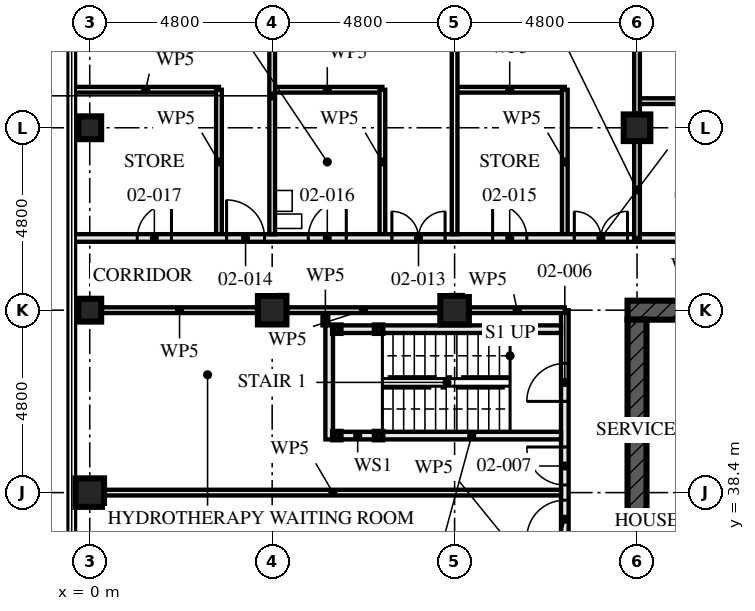
"""IFC4 building model, lengths in metres.
Left out: names, types, materials, properties, quantities, classifications, styles, units other than length and angle.
Written with IfcOpenShell. Run it as: python <this file> out.ifc"""

import sys

from ifc_helpers import new_model, si_unit, direction, frame, frame_2d, origin, origin_2d, place, context, subcontext, project, spatial, rectangle, hollow_rectangle, extrude, element, fill, save


model = new_model("IFC4")
c1 = context("Model", 3, precision=1e-05, world=origin(), true_north=direction((0.0, 1.0)))
c2 = subcontext(c1, "Body", "Model", "MODEL_VIEW")
j1 = project(units=[si_unit("LENGTHUNIT", "METRE"), si_unit("PLANEANGLEUNIT", "RADIAN")], contexts=[c1])
p1 = place(None, origin())
s1 = spatial("IfcSite", under=j1, at=p1, CompositionType="ELEMENT")
p2 = place(p1, origin())
s2 = spatial("IfcBuilding", under=s1, at=p2, CompositionType="ELEMENT")
p3 = place(p2, frame((0.0, 0.0, 9.0)))
s3 = spatial("IfcBuildingStorey", under=s2, at=p3, CompositionType="ELEMENT", Elevation=9.0)
p4 = place(p3, frame((0.0, 38.4, 0.0), z_axis=(0.0, 0.0, 1.0), x_axis=(1.0, 0.0, 0.0)))
e1 = element("IfcColumn", 1, at=p4, inside=s3, PredefinedType="COLUMN", context=c2, shape_type="SweptSolid", body=[
    extrude(hollow_rectangle(XDim=0.75, YDim=0.75, WallThickness=0.08, at=origin_2d()), origin(), (0.0, 0.0, 1.0), 4.5),
])
for number, where, z_axis, x_axis in (
    (2, (0.0, 43.2, 0.0), (0.0, 0.0, 1.0), (0.0, 1.0, 0.0)),
    (3, (0.0, 48.0, 0.0), (0.0, 0.0, 1.0), (1.0, 0.0, 0.0)),
):
    element("IfcColumn", number, at=place(p3, frame(where, z_axis=z_axis, x_axis=x_axis)), inside=s3, PredefinedType="COLUMN", context=c2, shape_type="SweptSolid", body=[
        extrude(hollow_rectangle(XDim=0.6, YDim=0.6, WallThickness=0.08, at=origin_2d()), origin(), (0.0, 0.0, 1.0), 4.5),
    ])
for number, where, z_axis, x_axis in (
    (4, (4.8, 43.2, 0.0), (0.0, 0.0, 1.0), (0.0, 1.0, 0.0)),
    (5, (9.6, 43.2, 0.0), (0.0, 0.0, 1.0), (0.0, 1.0, 0.0)),
):
    element("IfcColumn", number, at=place(p3, frame(where, z_axis=z_axis, x_axis=x_axis)), inside=s3, PredefinedType="COLUMN", context=c2, shape_type="SweptSolid", body=[
        extrude(hollow_rectangle(XDim=0.75, YDim=0.75, WallThickness=0.08, at=origin_2d()), origin(), (0.0, 0.0, 1.0), 4.5),
    ])
p5 = place(p3, frame((14.4, 48.0, 0.0), z_axis=(0.0, 0.0, 1.0), x_axis=(1.0, 0.0, 0.0)))
e6 = element("IfcColumn", 6, at=p5, inside=s3, PredefinedType="COLUMN", context=c2, shape_type="SweptSolid", body=[
    extrude(hollow_rectangle(XDim=0.7, YDim=0.7, WallThickness=0.06, at=origin_2d()), origin(), (0.0, 0.0, 1.0), 4.5),
])
p6 = place(p3, frame((29.05, 43.2, -0.17), z_axis=(0.0, 0.0, 1.0), x_axis=(-1.0, 0.0, 0.0)))
e7 = element("IfcWall", 7, at=p6, inside=s3, PredefinedType="SHEAR", context=c2, shape_type="SweptSolid", body=[
    extrude(rectangle(XDim=14.9, YDim=0.5, at=frame_2d((7.45, 0.0))), origin(), (0.0, 0.0, 1.0), 4.5),
])
p7 = place(p6, frame((6.85, 0.0, 0.17)))
e8 = element("IfcOpeningElement", 8, at=p7, cuts=e7, PredefinedType="OPENING", context=c2, shape_type="SweptSolid", body=[
    extrude(rectangle(XDim=1.2, YDim=2.1, at=frame_2d((0.6, 1.05))), frame((0.0, 0.26, 0.0), z_axis=(0.0, -1.0, 0.0), x_axis=(1.0, 0.0, 0.0)), (0.0, 0.0, 1.0), 0.521),
])
p8 = place(p3, frame((14.4, 42.95, -0.17), z_axis=(0.0, 0.0, 1.0), x_axis=(0.0, -1.0, 0.0)))
e9 = element("IfcWall", 9, at=p8, inside=s3, PredefinedType="SHEAR", context=c2, shape_type="SweptSolid", body=[
    extrude(rectangle(XDim=13.9, YDim=0.5, at=frame_2d((6.95, 0.0))), origin(), (0.0, 0.0, 1.0), 4.5),
])
p9 = place(p8, frame((6.35, 0.0, 0.17)))
e10 = element("IfcOpeningElement", 10, at=p9, cuts=e9, PredefinedType="OPENING", context=c2, shape_type="SweptSolid", body=[
    extrude(rectangle(XDim=1.2, YDim=2.1, at=frame_2d((0.6, 1.05))), frame((0.0, 0.26, 0.0), z_axis=(0.0, -1.0, 0.0), x_axis=(1.0, 0.0, 0.0)), (0.0, 0.0, 1.0), 0.521),
])
for number, where, z_axis, x_axis in (
    (11, (6.5, 42.7, 0.0), (0.0, 0.0, 1.0), (1.0, 0.0, 0.0)),
    (12, (6.5, 39.9, 0.0), (0.0, 0.0, 1.0), (1.0, 0.0, 0.0)),
    (13, (7.6, 42.7, 0.0), (0.0, 0.0, 1.0), (1.0, 0.0, 0.0)),
    (14, (7.6, 39.9, 0.0), (0.0, 0.0, 1.0), (1.0, 0.0, 0.0)),
):
    element("IfcColumn", number, at=place(p3, frame(where, z_axis=z_axis, x_axis=x_axis)), inside=s3, PredefinedType="COLUMN", context=c2, shape_type="SweptSolid", body=[
        extrude(hollow_rectangle(XDim=0.2, YDim=0.2, WallThickness=0.008, at=origin_2d()), origin(), (0.0, 0.0, 1.0), 4.33),
    ])
p10 = place(p3, frame((6.6, 42.7, 0.0), z_axis=(0.0, 0.0, 1.0), x_axis=(1.0, 0.0, 0.0)))
e15 = element("IfcWall", 15, at=p10, inside=s3, PredefinedType="SOLIDWALL", context=c2, shape_type="SweptSolid", body=[
    extrude(rectangle(XDim=0.9, YDim=0.2, at=frame_2d((0.45, 0.0))), origin(), (0.0, 0.0, 1.0), 3.99),
])
p11 = place(p3, frame((7.7, 42.7, 0.0), z_axis=(0.0, 0.0, 1.0), x_axis=(1.0, 0.0, 0.0)))
e16 = element("IfcWall", 16, at=p11, inside=s3, PredefinedType="SOLIDWALL", context=c2, shape_type="SweptSolid", body=[
    extrude(rectangle(XDim=4.7, YDim=0.2, at=frame_2d((2.35, 0.0))), origin(), (0.0, 0.0, 1.0), 3.99),
])
p12 = place(p3, frame((6.6, 39.9, 0.0), z_axis=(0.0, 0.0, 1.0), x_axis=(1.0, 0.0, 0.0)))
e17 = element("IfcWall", 17, at=p12, inside=s3, PredefinedType="SOLIDWALL", context=c2, shape_type="SweptSolid", body=[
    extrude(rectangle(XDim=0.9, YDim=0.2, at=frame_2d((0.45, 0.0))), origin(), (0.0, 0.0, 1.0), 3.99),
])
p13 = place(p3, frame((7.7, 39.9, 0.0), z_axis=(0.0, 0.0, 1.0), x_axis=(1.0, 0.0, 0.0)))
e18 = element("IfcWall", 18, at=p13, inside=s3, PredefinedType="SOLIDWALL", context=c2, shape_type="SweptSolid", body=[
    extrude(rectangle(XDim=4.7, YDim=0.2, at=frame_2d((2.35, 0.0))), origin(), (0.0, 0.0, 1.0), 3.99),
])
p14 = place(p3, frame((6.3, 42.8, 0.0), z_axis=(0.0, 0.0, 1.0), x_axis=(0.0, -1.0, 0.0)))
e19 = element("IfcWall", 19, at=p14, inside=s3, PredefinedType="SOLIDWALL", context=c2, shape_type="SweptSolid", body=[
    extrude(rectangle(XDim=3.0, YDim=0.2, at=frame_2d((1.5, 0.0))), origin(), (0.0, 0.0, 1.0), 4.33),
])
p15 = place(p3, frame((0.395, 38.4, 0.0), z_axis=(0.0, 0.0, 1.0), x_axis=(1.0, 0.0, 0.0)))
e20 = element("IfcWall", 20, at=p15, inside=s3, PredefinedType="PARTITIONING", context=c2, shape_type="SweptSolid", body=[
    extrude(rectangle(XDim=12.005, YDim=0.15, at=frame_2d((6.002, 0.0))), origin(), (0.0, 0.0, 1.0), 3.55),
])
p16 = place(p3, frame((6.2, 43.2, 0.0), z_axis=(0.0, 0.0, 1.0), x_axis=(0.0, -1.0, 0.0)))
e21 = element("IfcWall", 21, at=p16, inside=s3, PredefinedType="PARTITIONING", context=c2, shape_type="SweptSolid", body=[
    extrude(rectangle(XDim=0.4, YDim=0.15, at=frame_2d((0.2, 0.0))), origin(), (0.0, 0.0, 1.0), 4.33),
])
p17 = place(p3, frame((12.5, 43.2, 0.0), z_axis=(0.0, 0.0, 1.0), x_axis=(0.0, -1.0, 0.0)))
e22 = element("IfcWall", 22, at=p17, inside=s3, PredefinedType="PARTITIONING", context=c2, shape_type="SweptSolid", body=[
    extrude(rectangle(XDim=14.4, YDim=0.2, at=frame_2d((7.2, 0.0))), origin(), (0.0, 0.0, 1.0), 3.55),
])
p18 = place(p17, frame((1.4, 0.0, 0.0)))
e23 = element("IfcOpeningElement", 23, at=p18, cuts=e22, PredefinedType="OPENING", context=c2, shape_type="SweptSolid", body=[
    extrude(rectangle(XDim=1.0, YDim=2.1, at=frame_2d((0.5, 1.05))), frame((0.0, 0.111, 0.0), z_axis=(0.0, -1.0, 0.0), x_axis=(1.0, 0.0, 0.0)), (0.0, 0.0, 1.0), 0.221),
])
p19 = place(p17, frame((3.6, 0.0, 0.0)))
e24 = element("IfcOpeningElement", 24, at=p19, cuts=e22, PredefinedType="OPENING", context=c2, shape_type="SweptSolid", body=[
    extrude(rectangle(XDim=1.0, YDim=2.4, at=frame_2d((0.5, 1.2))), frame((0.0, 0.111, 0.0), z_axis=(0.0, -1.0, 0.0), x_axis=(1.0, 0.0, 0.0)), (0.0, 0.0, 1.0), 0.221),
])
p20 = place(p17, frame((5.0, 0.0, 0.0)))
e25 = element("IfcOpeningElement", 25, at=p20, cuts=e22, PredefinedType="OPENING", context=c2, shape_type="SweptSolid", body=[
    extrude(rectangle(XDim=1.0, YDim=2.4, at=frame_2d((0.5, 1.2))), frame((0.0, 0.111, 0.0), z_axis=(0.0, -1.0, 0.0), x_axis=(1.0, 0.0, 0.0)), (0.0, 0.0, 1.0), 0.221),
])
p21 = place(p17, frame((9.8, 0.0, 0.0)))
e26 = element("IfcOpeningElement", 26, at=p21, cuts=e22, PredefinedType="OPENING", context=c2, shape_type="SweptSolid", body=[
    extrude(rectangle(XDim=1.0, YDim=2.4, at=frame_2d((0.5, 1.2))), frame((0.0, 0.111, 0.0), z_axis=(0.0, -1.0, 0.0), x_axis=(1.0, 0.0, 0.0)), (0.0, 0.0, 1.0), 0.221),
])
p22 = place(p17, frame((7.45, 0.0, 0.0)))
e27 = element("IfcOpeningElement", 27, at=p22, cuts=e22, PredefinedType="OPENING", context=c2, shape_type="SweptSolid", body=[
    extrude(rectangle(XDim=0.9, YDim=2.1, at=frame_2d((0.45, 1.05))), frame((0.0, 0.111, 0.0), z_axis=(0.0, -1.0, 0.0), x_axis=(1.0, 0.0, 0.0)), (0.0, 0.0, 1.0), 0.221),
])
p23 = place(p17, frame((12.2, 0.0, 0.0)))
e28 = element("IfcOpeningElement", 28, at=p23, cuts=e22, PredefinedType="OPENING", context=c2, shape_type="SweptSolid", body=[
    extrude(rectangle(XDim=1.0, YDim=2.1, at=frame_2d((0.5, 1.05))), frame((0.0, 0.111, 0.0), z_axis=(0.0, -1.0, 0.0), x_axis=(1.0, 0.0, 0.0)), (0.0, 0.0, 1.0), 0.221),
])
p24 = place(p3, frame((12.5, 49.0, 0.0), z_axis=(0.0, 0.0, 1.0), x_axis=(0.0, -1.0, 0.0)))
e29 = element("IfcWall", 29, at=p24, inside=s3, PredefinedType="PARTITIONING", context=c2, shape_type="SweptSolid", body=[
    extrude(rectangle(XDim=3.8, YDim=0.15, at=frame_2d((1.9, 0.0))), origin(), (0.0, 0.0, 1.0), 3.55),
])
p25 = place(p3, frame((12.5, 49.0, 0.0), z_axis=(0.0, 0.0, 1.0), x_axis=(-1.0, 0.0, 0.0)))
e30 = element("IfcWall", 30, at=p25, inside=s3, PredefinedType="PARTITIONING", context=c2, shape_type="SweptSolid", body=[
    extrude(rectangle(XDim=2.9, YDim=0.15, at=frame_2d((1.45, 0.0))), origin(), (0.0, 0.0, 1.0), 4.33),
])
p26 = place(p3, frame((7.7, 49.0, 0.0), z_axis=(0.0, 0.0, 1.0), x_axis=(0.0, -1.0, 0.0)))
e31 = element("IfcWall", 31, at=p26, inside=s3, PredefinedType="PARTITIONING", context=c2, shape_type="SweptSolid", body=[
    extrude(rectangle(XDim=3.8, YDim=0.15, at=frame_2d((1.9, 0.0))), origin(), (0.0, 0.0, 1.0), 3.55),
])
p27 = place(p3, frame((7.7, 49.0, 0.0), z_axis=(0.0, 0.0, 1.0), x_axis=(-1.0, 0.0, 0.0)))
e32 = element("IfcWall", 32, at=p27, inside=s3, PredefinedType="PARTITIONING", context=c2, shape_type="SweptSolid", body=[
    extrude(rectangle(XDim=2.9, YDim=0.15, at=frame_2d((1.45, 0.0))), origin(), (0.0, 0.0, 1.0), 4.33),
])
p28 = place(p3, frame((3.4, 49.0, 0.0), z_axis=(0.0, 0.0, 1.0), x_axis=(0.0, -1.0, 0.0)))
e33 = element("IfcWall", 33, at=p28, inside=s3, PredefinedType="PARTITIONING", context=c2, shape_type="SweptSolid", body=[
    extrude(rectangle(XDim=3.8, YDim=0.15, at=frame_2d((1.9, 0.0))), origin(), (0.0, 0.0, 1.0), 3.55),
])
p29 = place(p3, frame((3.4, 49.0, 0.0), z_axis=(0.0, 0.0, 1.0), x_axis=(-1.0, 0.0, 0.0)))
e34 = element("IfcWall", 34, at=p29, inside=s3, PredefinedType="PARTITIONING", context=c2, shape_type="SweptSolid", body=[
    extrude(rectangle(XDim=3.855, YDim=0.15, at=frame_2d((1.927, 0.0))), origin(), (0.0, 0.0, 1.0), 3.32),
])
p30 = place(p3, frame((9.6, 57.28, 0.0), z_axis=(0.0, 0.0, 1.0), x_axis=(0.0, -1.0, 0.0)))
e35 = element("IfcWall", 35, at=p30, inside=s3, PredefinedType="PARTITIONING", context=c2, shape_type="SweptSolid", body=[
    extrude(rectangle(XDim=12.08, YDim=0.15, at=frame_2d((6.04, 0.0))), origin(), (0.0, 0.0, 1.0), 3.55),
])
p31 = place(p3, frame((4.8, 52.48, 0.0), z_axis=(0.0, 0.0, 1.0), x_axis=(0.0, -1.0, 0.0)))
e36 = element("IfcWall", 36, at=p31, inside=s3, PredefinedType="PARTITIONING", context=c2, shape_type="SweptSolid", body=[
    extrude(rectangle(XDim=7.28, YDim=0.15, at=frame_2d((3.64, 0.0))), origin(), (0.0, 0.0, 1.0), 3.55),
])
p32 = place(p3, frame((14.4, 45.1, 0.0), z_axis=(0.0, 0.0, 1.0), x_axis=(-1.0, 0.0, 0.0)))
e37 = element("IfcWall", 37, at=p32, inside=s3, PredefinedType="PARTITIONING", context=c2, shape_type="SweptSolid", body=[
    extrude(rectangle(XDim=14.855, YDim=0.2, at=frame_2d((7.427, 0.0))), origin(), (0.0, 0.0, 1.0), 3.32),
])
p33 = place(p32, frame((0.25, 0.0, 0.0)))
e38 = element("IfcOpeningElement", 38, at=p33, cuts=e37, PredefinedType="OPENING", context=c2, shape_type="SweptSolid", body=[
    extrude(rectangle(XDim=1.4, YDim=2.4, at=frame_2d((0.7, 1.2))), frame((0.0, 0.111, 0.0), z_axis=(0.0, -1.0, 0.0), x_axis=(1.0, 0.0, 0.0)), (0.0, 0.0, 1.0), 0.221),
])
p34 = place(p32, frame((5.05, 0.0, 0.0)))
e39 = element("IfcOpeningElement", 39, at=p34, cuts=e37, PredefinedType="OPENING", context=c2, shape_type="SweptSolid", body=[
    extrude(rectangle(XDim=1.4, YDim=2.4, at=frame_2d((0.7, 1.2))), frame((0.0, 0.111, 0.0), z_axis=(0.0, -1.0, 0.0), x_axis=(1.0, 0.0, 0.0)), (0.0, 0.0, 1.0), 0.221),
])
p35 = place(p32, frame((9.8, 0.0, 0.0)))
e40 = element("IfcOpeningElement", 40, at=p35, cuts=e37, PredefinedType="OPENING", context=c2, shape_type="SweptSolid", body=[
    extrude(rectangle(XDim=1.0, YDim=2.4, at=frame_2d((0.5, 1.2))), frame((0.0, 0.111, 0.0), z_axis=(0.0, -1.0, 0.0), x_axis=(1.0, 0.0, 0.0)), (0.0, 0.0, 1.0), 0.221),
])
p36 = place(p32, frame((2.9, 0.0, 0.0)))
e41 = element("IfcOpeningElement", 41, at=p36, cuts=e37, PredefinedType="OPENING", context=c2, shape_type="SweptSolid", body=[
    extrude(rectangle(XDim=0.9, YDim=2.1, at=frame_2d((0.45, 1.05))), frame((0.0, 0.111, 0.0), z_axis=(0.0, -1.0, 0.0), x_axis=(1.0, 0.0, 0.0)), (0.0, 0.0, 1.0), 0.221),
])
p37 = place(p32, frame((7.65, 0.0, 0.0)))
e42 = element("IfcOpeningElement", 42, at=p37, cuts=e37, PredefinedType="OPENING", context=c2, shape_type="SweptSolid", body=[
    extrude(rectangle(XDim=1.0, YDim=2.1, at=frame_2d((0.5, 1.05))), frame((0.0, 0.111, 0.0), z_axis=(0.0, -1.0, 0.0), x_axis=(1.0, 0.0, 0.0)), (0.0, 0.0, 1.0), 0.221),
])
p38 = place(p32, frame((12.25, 0.0, 0.0)))
e43 = element("IfcOpeningElement", 43, at=p38, cuts=e37, PredefinedType="OPENING", context=c2, shape_type="SweptSolid", body=[
    extrude(rectangle(XDim=0.9, YDim=2.1, at=frame_2d((0.45, 1.05))), frame((0.0, 0.111, 0.0), z_axis=(0.0, -1.0, 0.0), x_axis=(1.0, 0.0, 0.0)), (0.0, 0.0, 1.0), 0.221),
])
p39 = place(p3, frame((17.8, 48.7, 0.0), z_axis=(0.0, 0.0, 1.0), x_axis=(-1.0, 0.0, 0.0)))
e44 = element("IfcWall", 44, at=p39, inside=s3, PredefinedType="PARTITIONING", context=c2, shape_type="SweptSolid", body=[
    extrude(rectangle(XDim=3.4, YDim=0.15, at=frame_2d((1.7, 0.0))), origin(), (0.0, 0.0, 1.0), 4.33),
])
p40 = place(p3, frame((28.8, 45.1, 0.0), z_axis=(0.0, 0.0, 1.0), x_axis=(-1.0, 0.0, 0.0)))
e45 = element("IfcWall", 45, at=p40, inside=s3, PredefinedType="PARTITIONING", context=c2, shape_type="SweptSolid", body=[
    extrude(rectangle(XDim=14.4, YDim=0.2, at=frame_2d((7.2, 0.0))), origin(), (0.0, 0.0, 1.0), 4.33),
])
p41 = place(p40, frame((0.2, 0.0, 0.0)))
e46 = element("IfcOpeningElement", 46, at=p41, cuts=e45, PredefinedType="OPENING", context=c2, shape_type="SweptSolid", body=[
    extrude(rectangle(XDim=1.0, YDim=2.4, at=frame_2d((0.5, 1.2))), frame((0.0, 0.111, 0.0), z_axis=(0.0, -1.0, 0.0), x_axis=(1.0, 0.0, 0.0)), (0.0, 0.0, 1.0), 0.221),
])
p42 = place(p40, frame((5.0, 0.0, 0.0)))
e47 = element("IfcOpeningElement", 47, at=p42, cuts=e45, PredefinedType="OPENING", context=c2, shape_type="SweptSolid", body=[
    extrude(rectangle(XDim=1.0, YDim=2.4, at=frame_2d((0.5, 1.2))), frame((0.0, 0.111, 0.0), z_axis=(0.0, -1.0, 0.0), x_axis=(1.0, 0.0, 0.0)), (0.0, 0.0, 1.0), 0.221),
])
p43 = place(p40, frame((9.8, 0.0, 0.0)))
e48 = element("IfcOpeningElement", 48, at=p43, cuts=e45, PredefinedType="OPENING", context=c2, shape_type="SweptSolid", body=[
    extrude(rectangle(XDim=1.0, YDim=2.4, at=frame_2d((0.5, 1.2))), frame((0.0, 0.111, 0.0), z_axis=(0.0, -1.0, 0.0), x_axis=(1.0, 0.0, 0.0)), (0.0, 0.0, 1.0), 0.221),
])
p44 = place(p40, frame((2.65, 0.0, 0.0)))
e49 = element("IfcOpeningElement", 49, at=p44, cuts=e45, PredefinedType="OPENING", context=c2, shape_type="SweptSolid", body=[
    extrude(rectangle(XDim=0.9, YDim=2.1, at=frame_2d((0.45, 1.05))), frame((0.0, 0.111, 0.0), z_axis=(0.0, -1.0, 0.0), x_axis=(1.0, 0.0, 0.0)), (0.0, 0.0, 1.0), 0.221),
])
p45 = place(p40, frame((7.45, 0.0, 0.0)))
e50 = element("IfcOpeningElement", 50, at=p45, cuts=e45, PredefinedType="OPENING", context=c2, shape_type="SweptSolid", body=[
    extrude(rectangle(XDim=0.9, YDim=2.1, at=frame_2d((0.45, 1.05))), frame((0.0, 0.111, 0.0), z_axis=(0.0, -1.0, 0.0), x_axis=(1.0, 0.0, 0.0)), (0.0, 0.0, 1.0), 0.221),
])
p46 = place(p40, frame((12.25, 0.0, 0.0)))
e51 = element("IfcOpeningElement", 51, at=p46, cuts=e45, PredefinedType="OPENING", context=c2, shape_type="SweptSolid", body=[
    extrude(rectangle(XDim=0.9, YDim=2.1, at=frame_2d((0.45, 1.05))), frame((0.0, 0.111, 0.0), z_axis=(0.0, -1.0, 0.0), x_axis=(1.0, 0.0, 0.0)), (0.0, 0.0, 1.0), 0.221),
])
p47 = place(p3, frame((12.5, 43.2, 0.0), z_axis=(0.0, 0.0, 1.0), x_axis=(-1.0, 0.0, 0.0)))
e52 = element("IfcWall", 52, at=p47, inside=s3, PredefinedType="PARTITIONING", context=c2, shape_type="SweptSolid", body=[
    extrude(rectangle(XDim=2.505, YDim=0.15, at=frame_2d((1.252, 0.0))), origin(), (0.0, 0.0, 1.0), 3.32),
])
p48 = place(p3, frame((9.205, 43.2, 0.0), z_axis=(0.0, 0.0, 1.0), x_axis=(-1.0, 0.0, 0.0)))
e53 = element("IfcWall", 53, at=p48, inside=s3, PredefinedType="PARTITIONING", context=c2, shape_type="SweptSolid", body=[
    extrude(rectangle(XDim=4.01, YDim=0.15, at=frame_2d((2.005, 0.0))), origin(), (0.0, 0.0, 1.0), 3.32),
])
p49 = place(p3, frame((4.405, 43.2, 0.0), z_axis=(0.0, 0.0, 1.0), x_axis=(-1.0, 0.0, 0.0)))
e54 = element("IfcWall", 54, at=p49, inside=s3, PredefinedType="PARTITIONING", context=c2, shape_type="SweptSolid", body=[
    extrude(rectangle(XDim=4.085, YDim=0.15, at=frame_2d((2.042, 0.0))), origin(), (0.0, 0.0, 1.0), 3.32),
])
p50 = place(p3, frame((14.4, 45.1, 0.0), z_axis=(0.0, 0.0, 1.0), x_axis=(0.0, 1.0, 0.0)))
e55 = element("IfcWall", 55, at=p50, inside=s3, PredefinedType="PARTITIONING", context=c2, shape_type="SweptSolid", body=[
    extrude(rectangle(XDim=2.53, YDim=0.15, at=frame_2d((1.265, 0.0))), origin(), (0.0, 0.0, 1.0), 3.32),
])
p51 = place(p3, frame((14.4, 48.37, 0.0), z_axis=(0.0, 0.0, 1.0), x_axis=(0.0, 1.0, 0.0)))
e56 = element("IfcWall", 56, at=p51, inside=s3, PredefinedType="PARTITIONING", context=c2, shape_type="SweptSolid", body=[
    extrude(rectangle(XDim=4.06, YDim=0.15, at=frame_2d((2.03, 0.0))), origin(), (0.0, 0.0, 1.0), 3.32),
])
p52 = place(p18, frame((1.0, 0.0, 0.0), z_axis=(0.0, 0.0, 1.0), x_axis=(-1.0, 0.0, 0.0)))
e57 = element("IfcDoor", 57, at=p52, inside=s3, OperationType="SINGLE_SWING_RIGHT", PredefinedType="DOOR", context=c2, shape_type="SweptSolid", body=[
    extrude(rectangle(XDim=1.0, YDim=2.1, at=frame_2d((0.5, 1.05))), frame((0.0, 0.032, 0.0), z_axis=(0.0, -1.0, 0.0), x_axis=(1.0, 0.0, 0.0)), (0.0, 0.0, 1.0), 0.064),
])
fill(e23, e57)
p53 = place(p19, frame((1.0, 0.0, 0.0), z_axis=(0.0, 0.0, 1.0), x_axis=(-1.0, 0.0, 0.0)))
e58 = element("IfcDoor", 58, at=p53, inside=s3, OperationType="SINGLE_SWING_LEFT", PredefinedType="DOOR", context=c2, shape_type="SweptSolid", body=[
    extrude(rectangle(XDim=1.0, YDim=2.4, at=frame_2d((0.5, 1.2))), frame((0.0, 0.027, 0.0), z_axis=(0.0, -1.0, 0.0), x_axis=(1.0, 0.0, 0.0)), (0.0, 0.0, 1.0), 0.054),
])
fill(e24, e58)
p54 = place(p20, frame((1.0, 0.0, 0.0), z_axis=(0.0, 0.0, 1.0), x_axis=(-1.0, 0.0, 0.0)))
e59 = element("IfcDoor", 59, at=p54, inside=s3, OperationType="SINGLE_SWING_RIGHT", PredefinedType="DOOR", context=c2, shape_type="SweptSolid", body=[
    extrude(rectangle(XDim=1.0, YDim=2.4, at=frame_2d((0.5, 1.2))), frame((0.0, 0.027, 0.0), z_axis=(0.0, -1.0, 0.0), x_axis=(1.0, 0.0, 0.0)), (0.0, 0.0, 1.0), 0.054),
])
fill(e25, e59)
p55 = place(p33, frame((1.4, 0.0, 0.0), z_axis=(0.0, 0.0, 1.0), x_axis=(-1.0, 0.0, 0.0)))
e60 = element("IfcDoor", 60, at=p55, inside=s3, OperationType="DOUBLE_DOOR_SINGLE_SWING", PredefinedType="DOOR", context=c2, shape_type="SweptSolid", body=[
    extrude(rectangle(XDim=1.4, YDim=2.4, at=frame_2d((0.7, 1.2))), frame((0.0, 0.027, 0.0), z_axis=(0.0, -1.0, 0.0), x_axis=(1.0, 0.0, 0.0)), (0.0, 0.0, 1.0), 0.054),
])
fill(e38, e60)
p56 = place(p34, frame((1.4, 0.0, 0.0), z_axis=(0.0, 0.0, 1.0), x_axis=(-1.0, 0.0, 0.0)))
e61 = element("IfcDoor", 61, at=p56, inside=s3, OperationType="DOUBLE_DOOR_SINGLE_SWING", PredefinedType="DOOR", context=c2, shape_type="SweptSolid", body=[
    extrude(rectangle(XDim=1.4, YDim=2.4, at=frame_2d((0.7, 1.2))), frame((0.0, 0.027, 0.0), z_axis=(0.0, -1.0, 0.0), x_axis=(1.0, 0.0, 0.0)), (0.0, 0.0, 1.0), 0.054),
])
fill(e39, e61)
p57 = place(p35, frame((1.0, 0.0, 0.0), z_axis=(0.0, 0.0, 1.0), x_axis=(-1.0, 0.0, 0.0)))
e62 = element("IfcDoor", 62, at=p57, inside=s3, OperationType="SINGLE_SWING_RIGHT", PredefinedType="DOOR", context=c2, shape_type="SweptSolid", body=[
    extrude(rectangle(XDim=1.0, YDim=2.4, at=frame_2d((0.5, 1.2))), frame((0.0, 0.027, 0.0), z_axis=(0.0, -1.0, 0.0), x_axis=(1.0, 0.0, 0.0)), (0.0, 0.0, 1.0), 0.054),
])
fill(e40, e62)
p58 = place(p36, frame((0.9, 0.0, 0.0), z_axis=(0.0, 0.0, 1.0), x_axis=(-1.0, 0.0, 0.0)))
e63 = element("IfcDoor", 63, at=p58, inside=s3, OperationType="SINGLE_SWING_RIGHT", PredefinedType="DOOR", context=c2, shape_type="SweptSolid", body=[
    extrude(rectangle(XDim=0.9, YDim=2.1, at=frame_2d((0.45, 1.05))), frame((0.0, 0.027, 0.0), z_axis=(0.0, -1.0, 0.0), x_axis=(1.0, 0.0, 0.0)), (0.0, 0.0, 1.0), 0.054),
])
fill(e41, e63)
p59 = place(p37, frame((1.0, 0.0, 0.0), z_axis=(0.0, 0.0, 1.0), x_axis=(-1.0, 0.0, 0.0)))
e64 = element("IfcDoor", 64, at=p59, inside=s3, OperationType="SINGLE_SWING_LEFT", PredefinedType="DOOR", context=c2, shape_type="SweptSolid", body=[
    extrude(rectangle(XDim=1.0, YDim=2.1, at=frame_2d((0.5, 1.05))), frame((0.0, 0.027, 0.0), z_axis=(0.0, -1.0, 0.0), x_axis=(1.0, 0.0, 0.0)), (0.0, 0.0, 1.0), 0.054),
])
fill(e42, e64)
p60 = place(p38, frame((0.9, 0.0, 0.0), z_axis=(0.0, 0.0, 1.0), x_axis=(-1.0, 0.0, 0.0)))
e65 = element("IfcDoor", 65, at=p60, inside=s3, OperationType="SINGLE_SWING_LEFT", PredefinedType="DOOR", context=c2, shape_type="SweptSolid", body=[
    extrude(rectangle(XDim=0.9, YDim=2.1, at=frame_2d((0.45, 1.05))), frame((0.0, 0.027, 0.0), z_axis=(0.0, -1.0, 0.0), x_axis=(1.0, 0.0, 0.0)), (0.0, 0.0, 1.0), 0.054),
])
fill(e43, e65)
save(model, sys.argv[1])
